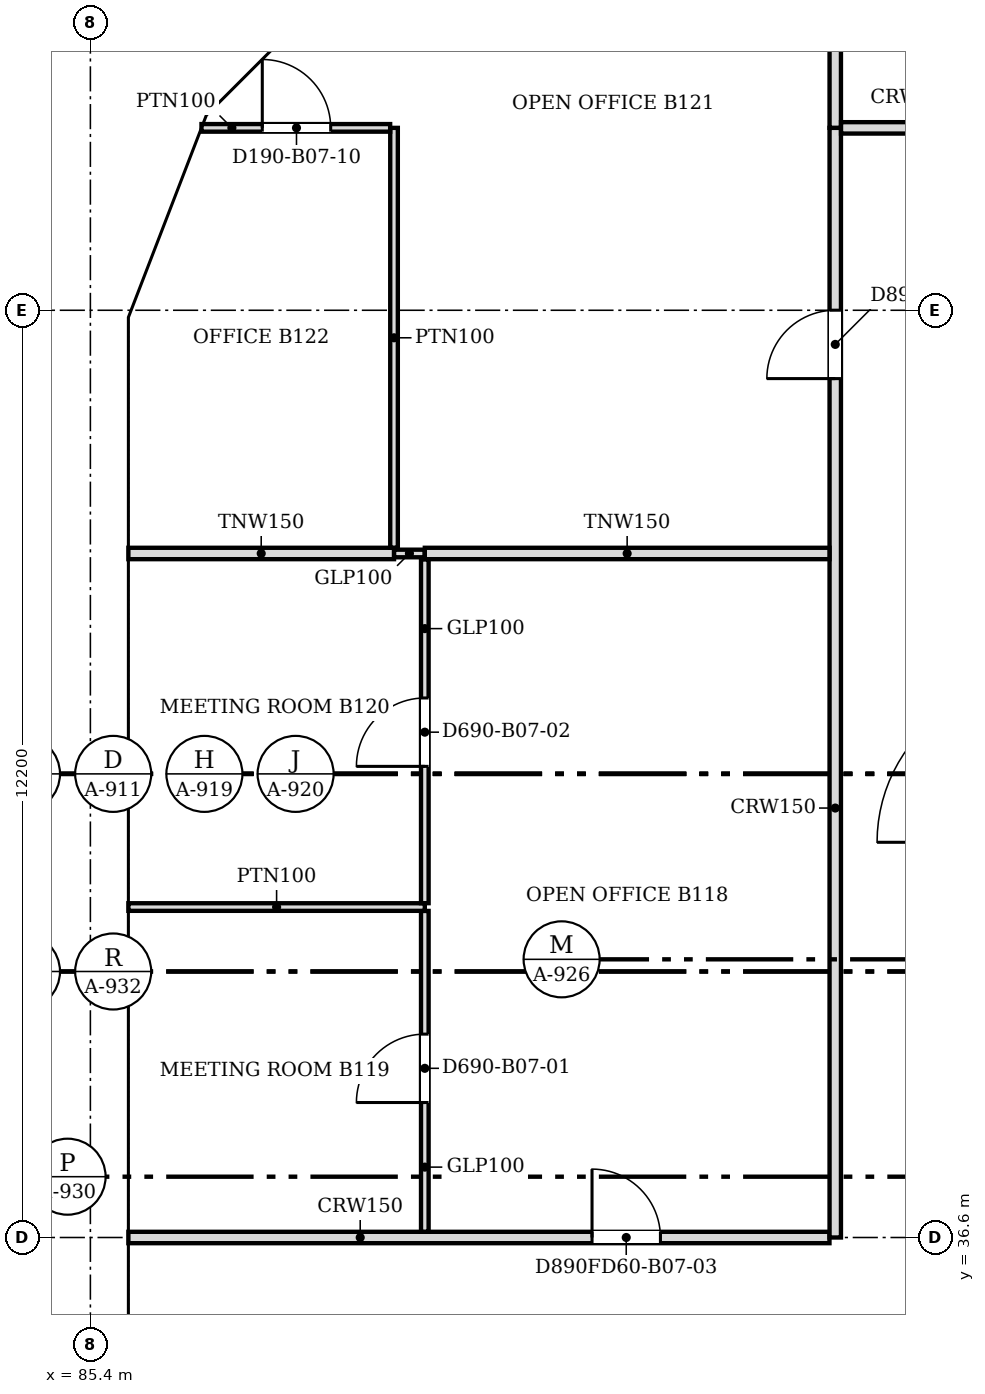
"""IFC4 building model, lengths in metres.
Left out: names, types, materials, properties, quantities, classifications, styles, units other than length and angle.
Written with IfcOpenShell. Run it as: python <this file> out.ifc"""

import sys

from ifc_helpers import new_model, si_unit, direction, frame, frame_2d, origin, place, context, subcontext, project, spatial, polyline, rectangle, outline, extrude, faceted_brep, source, transform, mapped, element, fill, save


model = new_model("IFC4")
c1 = context("Model", 3, precision=1e-05, world=origin(), true_north=direction((0.0, 1.0)))
c2 = subcontext(c1, "Body", "Model", "MODEL_VIEW")
j1 = project(units=[si_unit("LENGTHUNIT", "METRE"), si_unit("PLANEANGLEUNIT", "RADIAN")], contexts=[c1])
p1 = place(None, origin())
s1 = spatial("IfcSite", under=j1, at=p1, CompositionType="ELEMENT")
p2 = place(p1, origin())
s2 = spatial("IfcBuilding", under=s1, at=p2, CompositionType="ELEMENT")
p3 = place(p2, frame((0.0, 0.0, 72.4)))
s3 = spatial("IfcBuildingStorey", under=s2, at=p3, CompositionType="ELEMENT", Elevation=72.4)
m1 = source(origin(), c2, "Body", "Brep", [
    faceted_brep([(0.053, -0.25, 0.0), (2.997, -0.25, 3.8), (0.053, -0.25, 7.6), (0.0, -0.25, 7.532), (0.0, -0.25, 0.068), (0.106, 0.25, 7.531), (2.944, 0.25, 3.868), (2.944, 0.25, 3.732), (0.106, 0.25, 0.068), (2.997, 0.0, 3.8), (0.053, 0.0, 0.0), (0.053, 0.0, 7.6)], [[[0, 1, 2, 3, 4]], [[5, 6, 7, 8]], [[8, 7, 9, 1, 0, 10]], [[6, 5, 11, 2, 1, 9]], [[3, 2, 11]], [[10, 0, 4]], [[8, 10, 4, 3, 11, 5]], [[9, 7, 6]]]),
])
p4 = place(p3, frame((88.831, 53.625, -3.8), z_axis=(0.0, 0.0, 1.0), x_axis=(-0.707147509625, -0.707066050402, 0.0)))
e1 = element("IfcWall", 1, at=p4, inside=s3, PredefinedType="SOLIDWALL", context=c2, shape_type="MappedRepresentation", body=[
    mapped(m1, transform((0.0, 0.0, 0.0), scale=1.0)),
])
m2 = source(origin(), c2, "Body", "SweptSolid", [
    extrude(outline(polyline([(0.253, 0.666), (2.681, 3.8), (0.253, 6.934), (0.253, 0.666)])), frame((0.0, 0.26, 0.0), z_axis=(0.0, -1.0, 0.0), x_axis=(1.0, 0.0, 0.0)), (0.0, 0.0, 1.0), 0.52),
])
p5 = place(p4, origin())
e2 = element("IfcOpeningElement", 2, at=p5, cuts=e1, PredefinedType="OPENING", context=c2, shape_type="MappedRepresentation", body=[
    mapped(m2, transform((0.0, 0.0, 0.0), scale=1.0)),
])
m3 = source(origin(), c2, "Body", "Brep", [
    faceted_brep([(2.95, -0.25, 0.0), (2.997, -0.25, 0.059), (2.997, -0.25, 7.541), (2.95, -0.25, 7.6), (0.0, -0.25, 3.8), (0.053, 0.25, 3.868), (2.904, 0.25, 7.54), (2.904, 0.25, 0.06), (0.053, 0.25, 3.732), (2.95, 0.0, 0.0), (2.95, 0.0, 7.6), (0.0, 0.0, 3.8)], [[[0, 1, 2, 3, 4]], [[5, 6, 7, 8]], [[1, 0, 9]], [[10, 3, 2]], [[6, 5, 11, 4, 3, 10]], [[8, 7, 9, 0, 4, 11]], [[8, 11, 5]], [[1, 9, 7, 6, 10, 2]]]),
])
p6 = place(p3, frame((86.712, 51.506, -3.8), z_axis=(0.0, 0.0, 1.0), x_axis=(-0.359874094142, -0.933000876937, 0.0)))
e3 = element("IfcWall", 3, at=p6, inside=s3, PredefinedType="SOLIDWALL", context=c2, shape_type="MappedRepresentation", body=[
    mapped(m3, transform((0.0, 0.0, 0.0), scale=1.0)),
])
m4 = source(origin(), c2, "Body", "SweptSolid", [
    extrude(outline(polyline([(2.75, 6.935), (0.316, 3.8), (2.75, 0.665), (2.75, 6.935)])), frame((0.0, 0.26, 0.0), z_axis=(0.0, -1.0, 0.0), x_axis=(1.0, 0.0, 0.0)), (0.0, 0.0, 1.0), 0.52),
])
p7 = place(p6, origin())
e4 = element("IfcOpeningElement", 4, at=p7, cuts=e3, PredefinedType="OPENING", context=c2, shape_type="MappedRepresentation", body=[
    mapped(m4, transform((0.0, 0.0, 0.0), scale=1.0)),
])
m5 = source(origin(), c2, "Body", "Brep", [
    faceted_brep([(0.047, -0.25, 0.0), (3.05, -0.25, 3.8), (0.047, -0.25, 7.6), (0.0, -0.25, 7.54), (0.0, -0.25, 0.06), (0.093, 0.25, 7.541), (3.05, 0.25, 3.8), (0.093, 0.25, 0.059), (0.047, 0.0, 0.0), (0.047, 0.0, 7.6)], [[[0, 1, 2, 3, 4]], [[5, 6, 7]], [[7, 6, 1, 0, 8]], [[6, 5, 9, 2, 1]], [[3, 2, 9]], [[8, 0, 4]], [[7, 8, 4, 3, 9, 5]]]),
])
p8 = place(p3, frame((85.65, 48.8, -3.8), z_axis=(0.0, 0.0, 1.0), x_axis=(0.0, -1.0, 0.0)))
e5 = element("IfcWall", 5, at=p8, inside=s3, PredefinedType="SOLIDWALL", context=c2, shape_type="MappedRepresentation", body=[
    mapped(m5, transform((0.0, 0.0, 0.0), scale=1.0)),
])
m6 = source(origin(), c2, "Body", "SweptSolid", [
    extrude(outline(polyline([(0.247, 0.656), (2.731, 3.8), (0.247, 6.944), (0.247, 0.656)])), frame((0.0, 0.26, 0.0), z_axis=(0.0, -1.0, 0.0), x_axis=(1.0, 0.0, 0.0)), (0.0, 0.0, 1.0), 0.52),
])
p9 = place(p8, origin())
e6 = element("IfcOpeningElement", 6, at=p9, cuts=e5, PredefinedType="OPENING", context=c2, shape_type="MappedRepresentation", body=[
    mapped(m6, transform((0.0, 0.0, 0.0), scale=1.0)),
])
m7 = source(origin(), c2, "Body", "SweptSolid", [
    extrude(outline(polyline([(3.05, 0.0), (6.1, 3.8), (3.05, 7.6), (0.0, 3.8), (3.05, 0.0)])), frame((0.0, 0.25, 0.0), z_axis=(0.0, -1.0, 0.0), x_axis=(1.0, 0.0, 0.0)), (0.0, 0.0, 1.0), 0.5),
])
p10 = place(p3, frame((85.65, 45.75, -3.8), z_axis=(0.0, 0.0, 1.0), x_axis=(0.0, -1.0, 0.0)))
e7 = element("IfcWall", 7, at=p10, inside=s3, PredefinedType="SOLIDWALL", context=c2, shape_type="MappedRepresentation", body=[
    mapped(m7, transform((0.0, 0.0, 0.0), scale=1.0)),
])
m8 = source(origin(), c2, "Body", "SweptSolid", [
    extrude(outline(polyline([(3.05, 0.399), (5.78, 3.8), (3.05, 7.2), (0.321, 3.8), (3.05, 0.399)])), frame((0.0, 0.26, 0.0), z_axis=(0.0, -1.0, 0.0), x_axis=(1.0, 0.0, 0.0)), (0.0, 0.0, 1.0), 0.52),
])
p11 = place(p10, origin())
e8 = element("IfcOpeningElement", 8, at=p11, cuts=e7, PredefinedType="OPENING", context=c2, shape_type="MappedRepresentation", body=[
    mapped(m8, transform((0.0, 0.0, 0.0), scale=1.0)),
])
m9 = source(origin(), c2, "Body", "Brep", [
    faceted_brep([(3.05, -0.25, 0.0), (6.1, -0.25, 3.8), (6.1, -0.25, 3.8), (3.05, -0.25, 7.6), (0.0, -0.25, 3.8), (0.0, 0.25, 3.8), (3.05, 0.25, 7.6), (6.1, 0.25, 3.8), (6.1, 0.25, 3.8), (3.05, 0.25, 0.0)], [[[0, 1, 2, 3, 4]], [[5, 6, 7, 8, 9]], [[9, 8, 1, 0]], [[7, 6, 3, 2]], [[6, 5, 4, 3]], [[5, 9, 0, 4]], [[1, 8, 7, 2]]]),
])
p12 = place(p3, frame((85.65, 39.65, -3.8), z_axis=(0.0, 0.0, 1.0), x_axis=(0.0, -1.0, 0.0)))
e9 = element("IfcWall", 9, at=p12, inside=s3, PredefinedType="SOLIDWALL", context=c2, shape_type="MappedRepresentation", body=[
    mapped(m9, transform((0.0, 0.0, 0.0), scale=1.0)),
])
p13 = place(p12, origin())
e10 = element("IfcOpeningElement", 10, at=p13, cuts=e9, PredefinedType="OPENING", context=c2, shape_type="MappedRepresentation", body=[
    mapped(m8, transform((0.0, 0.0, 0.0), scale=1.0)),
])
p14 = place(p2, frame((0.0, 0.0, 76.2)))
s4 = spatial("IfcBuildingStorey", under=s2, at=p14, CompositionType="ELEMENT", Elevation=76.2)
m10 = source(origin(), c2, "Body", "Brep", [
    faceted_brep([(2.944, -0.25, 0.0), (2.997, -0.25, 0.068), (2.997, -0.25, 7.532), (2.944, -0.25, 7.6), (0.0, -0.25, 3.8), (0.053, 0.25, 3.868), (2.891, 0.25, 7.532), (2.891, 0.25, 0.068), (0.053, 0.25, 3.732), (2.944, 0.0, 0.0), (2.944, 0.0, 7.6), (0.0, 0.0, 3.8)], [[[0, 1, 2, 3, 4]], [[5, 6, 7, 8]], [[1, 0, 9]], [[10, 3, 2]], [[6, 5, 11, 4, 3, 10]], [[8, 7, 9, 0, 4, 11]], [[8, 11, 5]], [[1, 9, 7, 6, 10, 2]]]),
])
p15 = place(p14, frame((88.794, 53.588, -3.8), z_axis=(0.0, 0.0, 1.0), x_axis=(-0.707066050402, -0.707147509625, 0.0)))
e11 = element("IfcWall", 11, at=p15, inside=s4, PredefinedType="SOLIDWALL", context=c2, shape_type="MappedRepresentation", body=[
    mapped(m10, transform((0.0, 0.0, 0.0), scale=1.0)),
])
m11 = source(origin(), c2, "Body", "SweptSolid", [
    extrude(outline(polyline([(2.744, 6.934), (0.316, 3.8), (2.744, 0.667), (2.744, 6.934)])), frame((0.0, 0.26, 0.0), z_axis=(0.0, -1.0, 0.0), x_axis=(1.0, 0.0, 0.0)), (0.0, 0.0, 1.0), 0.52),
])
p16 = place(p15, origin())
e12 = element("IfcOpeningElement", 12, at=p16, cuts=e11, PredefinedType="OPENING", context=c2, shape_type="MappedRepresentation", body=[
    mapped(m11, transform((0.0, 0.0, 0.0), scale=1.0)),
])
m12 = source(origin(), c2, "Body", "Brep", [
    faceted_brep([(0.053, -0.25, 0.0), (3.003, -0.25, 3.8), (0.053, -0.25, 7.6), (0.0, -0.25, 7.532), (0.0, -0.25, 0.068), (0.106, 0.25, 7.532), (2.957, 0.25, 3.86), (2.957, 0.25, 3.74), (0.106, 0.25, 0.068), (3.003, 0.0, 3.8), (0.053, 0.0, 0.0), (0.053, 0.0, 7.6)], [[[0, 1, 2, 3, 4]], [[5, 6, 7, 8]], [[8, 7, 9, 1, 0, 10]], [[6, 5, 11, 2, 1, 9]], [[3, 2, 11]], [[10, 0, 4]], [[8, 10, 4, 3, 11, 5]], [[9, 7, 6]]]),
])
p17 = place(p14, frame((86.731, 51.556, -3.8), z_axis=(0.0, 0.0, 1.0), x_axis=(-0.359855894603, -0.933007896601, 0.0)))
e13 = element("IfcWall", 13, at=p17, inside=s4, PredefinedType="SOLIDWALL", context=c2, shape_type="MappedRepresentation", body=[
    mapped(m12, transform((0.0, 0.0, 0.0), scale=1.0)),
])
m13 = source(origin(), c2, "Body", "SweptSolid", [
    extrude(outline(polyline([(0.253, 0.665), (2.687, 3.8), (0.253, 6.935), (0.253, 0.665)])), frame((0.0, 0.26, 0.0), z_axis=(0.0, -1.0, 0.0), x_axis=(1.0, 0.0, 0.0)), (0.0, 0.0, 1.0), 0.52),
])
p18 = place(p17, origin())
e14 = element("IfcOpeningElement", 14, at=p18, cuts=e13, PredefinedType="OPENING", context=c2, shape_type="MappedRepresentation", body=[
    mapped(m13, transform((0.0, 0.0, 0.0), scale=1.0)),
])
m14 = source(origin(), c2, "Body", "Brep", [
    faceted_brep([(3.003, -0.25, 0.0), (6.053, -0.25, 3.8), (3.003, -0.25, 7.6), (0.0, -0.25, 3.8), (0.047, 0.25, 3.859), (3.003, 0.25, 7.6), (6.053, 0.25, 3.8), (3.003, 0.25, 0.0), (0.047, 0.25, 3.741), (0.0, 0.0, 3.8)], [[[0, 1, 2, 3]], [[4, 5, 6, 7, 8]], [[7, 6, 1, 0]], [[6, 5, 2, 1]], [[5, 4, 9, 3, 2]], [[8, 7, 0, 3, 9]], [[8, 9, 4]]]),
])
p19 = place(p14, frame((85.65, 48.753, -3.8), z_axis=(0.0, 0.0, 1.0), x_axis=(0.0, -1.0, 0.0)))
e15 = element("IfcWall", 15, at=p19, inside=s4, PredefinedType="SOLIDWALL", context=c2, shape_type="MappedRepresentation", body=[
    mapped(m14, transform((0.0, 0.0, 0.0), scale=1.0)),
])
m15 = source(origin(), c2, "Body", "SweptSolid", [
    extrude(outline(polyline([(3.005, 0.401), (5.733, 3.8), (3.005, 7.199), (0.319, 3.8), (3.005, 0.401)])), frame((0.0, 0.26, 0.0), z_axis=(0.0, -1.0, 0.0), x_axis=(1.0, 0.0, 0.0)), (0.0, 0.0, 1.0), 0.52),
])
p20 = place(p19, origin())
e16 = element("IfcOpeningElement", 16, at=p20, cuts=e15, PredefinedType="OPENING", context=c2, shape_type="MappedRepresentation", body=[
    mapped(m15, transform((0.0, 0.0, 0.0), scale=1.0)),
])
m16 = source(origin(), c2, "Body", "Brep", [
    faceted_brep([(3.05, -0.25, 0.0), (6.1, -0.25, 3.8), (6.1, -0.25, 3.8), (3.05, -0.25, 7.6), (0.0, -0.25, 3.8), (0.0, 0.25, 3.8), (3.05, 0.25, 7.6), (6.1, 0.25, 3.8), (6.1, 0.25, 3.8), (3.05, 0.25, 0.0)], [[[0, 1, 2, 3, 4]], [[5, 6, 7, 8, 9]], [[9, 8, 1, 0]], [[7, 6, 3, 2]], [[6, 5, 4, 3]], [[5, 9, 0, 4]], [[1, 8, 7, 2]]]),
])
p21 = place(p14, frame((85.65, 42.7, -3.8), z_axis=(0.0, 0.0, 1.0), x_axis=(0.0, -1.0, 0.0)))
e17 = element("IfcWall", 17, at=p21, inside=s4, PredefinedType="SOLIDWALL", context=c2, shape_type="MappedRepresentation", body=[
    mapped(m16, transform((0.0, 0.0, 0.0), scale=1.0)),
])
m17 = source(origin(), c2, "Body", "SweptSolid", [
    extrude(outline(polyline([(3.05, 0.399), (5.78, 3.8), (3.05, 7.201), (0.321, 3.8), (3.05, 0.399)])), frame((0.0, 0.26, 0.0), z_axis=(0.0, -1.0, 0.0), x_axis=(1.0, 0.0, 0.0)), (0.0, 0.0, 1.0), 0.52),
])
p22 = place(p21, origin())
e18 = element("IfcOpeningElement", 18, at=p22, cuts=e17, PredefinedType="OPENING", context=c2, shape_type="MappedRepresentation", body=[
    mapped(m17, transform((0.0, 0.0, 0.0), scale=1.0)),
])
m18 = source(origin(), c2, "Body", "SweptSolid", [
    extrude(outline(polyline([(3.05, 0.0), (6.1, 3.8), (3.05, 7.6), (0.0, 3.8), (3.05, 0.0)])), frame((0.0, 0.25, 0.0), z_axis=(0.0, -1.0, 0.0), x_axis=(1.0, 0.0, 0.0)), (0.0, 0.0, 1.0), 0.5),
])
p23 = place(p14, frame((85.65, 36.6, -3.8), z_axis=(0.0, 0.0, 1.0), x_axis=(0.0, -1.0, 0.0)))
e19 = element("IfcWall", 19, at=p23, inside=s4, PredefinedType="SOLIDWALL", context=c2, shape_type="MappedRepresentation", body=[
    mapped(m18, transform((0.0, 0.0, 0.0), scale=1.0)),
])
p24 = place(p23, origin())
e20 = element("IfcOpeningElement", 20, at=p24, cuts=e19, PredefinedType="OPENING", context=c2, shape_type="MappedRepresentation", body=[
    mapped(m17, transform((0.0, 0.0, 0.0), scale=1.0)),
])
p25 = place(p3, frame((85.9, 36.6, 0.0), z_axis=(0.0, 0.0, 1.0), x_axis=(1.0, 0.0, 0.0)))
e21 = element("IfcWall", 21, at=p25, inside=s3, PredefinedType="PARTITIONING", context=c2, shape_type="SweptSolid", body=[
    extrude(rectangle(XDim=9.224, YDim=0.15, at=frame_2d((4.612, 0.0))), origin(), (0.0, 0.0, 1.0), 3.067),
])
m19 = source(origin(), c2, "Body", "SweptSolid", [
    extrude(rectangle(XDim=0.9, YDim=2.1, at=frame_2d((0.45, 1.05))), frame((0.0, 0.085, 0.0), z_axis=(0.0, -1.0, 0.0), x_axis=(1.0, 0.0, 0.0)), (0.0, 0.0, 1.0), 0.17),
])
p26 = place(p25, frame((6.1, 0.0, 0.0)))
e22 = element("IfcOpeningElement", 22, at=p26, cuts=e21, PredefinedType="OPENING", context=c2, shape_type="MappedRepresentation", body=[
    mapped(m19, transform((0.0, 0.0, 0.0), scale=1.0)),
])
p27 = place(p3, frame((95.2, 36.6, 0.0), z_axis=(0.0, 0.0, 1.0), x_axis=(0.0, 1.0, 0.0)))
e23 = element("IfcWall", 23, at=p27, inside=s3, PredefinedType="PARTITIONING", context=c2, shape_type="SweptSolid", body=[
    extrude(rectangle(XDim=14.6, YDim=0.15, at=frame_2d((7.3, 0.0))), origin(), (0.0, 0.0, 1.0), 3.067),
])
p28 = place(p27, frame((11.301, 0.0, 0.0)))
e24 = element("IfcOpeningElement", 24, at=p28, cuts=e23, PredefinedType="OPENING", context=c2, shape_type="MappedRepresentation", body=[
    mapped(m19, transform((0.0, 0.0, 0.0), scale=1.0)),
])
p29 = place(p3, frame((89.8, 36.676, 0.0), z_axis=(0.0, 0.0, 1.0), x_axis=(0.0, 1.0, 0.0)))
e25 = element("IfcWall", 25, at=p29, inside=s3, PredefinedType="PARTITIONING", context=c2, shape_type="SweptSolid", body=[
    extrude(rectangle(XDim=4.221, YDim=0.1, at=frame_2d((2.11, 0.0))), origin(), (0.0, 0.0, 1.0), 3.067),
])
m20 = source(origin(), c2, "Body", "SweptSolid", [
    extrude(rectangle(XDim=0.9, YDim=2.1, at=frame_2d((0.45, 1.05))), frame((0.0, 0.06, 0.0), z_axis=(0.0, -1.0, 0.0), x_axis=(1.0, 0.0, 0.0)), (0.0, 0.0, 1.0), 0.12),
])
p30 = place(p29, frame((1.7, 0.0, 0.0)))
e26 = element("IfcOpeningElement", 26, at=p30, cuts=e25, PredefinedType="OPENING", context=c2, shape_type="MappedRepresentation", body=[
    mapped(m20, transform((0.0, 0.0, 0.0), scale=1.0)),
])
p31 = place(p3, frame((85.9, 40.948, 0.0), z_axis=(0.0, 0.0, 1.0), x_axis=(1.0, 0.0, 0.0)))
e27 = element("IfcWall", 27, at=p31, inside=s3, PredefinedType="PARTITIONING", context=c2, shape_type="SweptSolid", body=[
    extrude(rectangle(XDim=3.9, YDim=0.1, at=frame_2d((1.95, 0.0))), origin(), (0.0, 0.0, 1.0), 3.067),
])
p32 = place(p3, frame((89.8, 40.999, 0.0), z_axis=(0.0, 0.0, 1.0), x_axis=(0.0, 1.0, 0.0)))
e28 = element("IfcWall", 28, at=p32, inside=s3, PredefinedType="PARTITIONING", context=c2, shape_type="SweptSolid", body=[
    extrude(rectangle(XDim=4.525, YDim=0.1, at=frame_2d((2.263, 0.0))), origin(), (0.0, 0.0, 1.0), 3.067),
])
p33 = place(p32, frame((1.8, 0.0, 0.0)))
e29 = element("IfcOpeningElement", 29, at=p33, cuts=e28, PredefinedType="OPENING", context=c2, shape_type="MappedRepresentation", body=[
    mapped(m20, transform((0.0, 0.0, 0.0), scale=1.0)),
])
p34 = place(p3, frame((85.9, 45.6, 0.0), z_axis=(0.0, 0.0, 1.0), x_axis=(1.0, 0.0, 0.0)))
e30 = element("IfcWall", 30, at=p34, inside=s3, PredefinedType="PARTITIONING", context=c2, shape_type="SweptSolid", body=[
    extrude(rectangle(XDim=3.495, YDim=0.15, at=frame_2d((1.748, 0.0))), origin(), (0.0, 0.0, 1.0), 3.067),
])
p35 = place(p3, frame((89.396, 45.6, 0.0), z_axis=(0.0, 0.0, 1.0), x_axis=(1.0, 0.0, 0.0)))
e31 = element("IfcWall", 31, at=p35, inside=s3, PredefinedType="PARTITIONING", context=c2, shape_type="SweptSolid", body=[
    extrude(rectangle(XDim=0.403, YDim=0.1, at=frame_2d((0.202, 0.0))), origin(), (0.0, 0.0, 1.0), 3.067),
])
p36 = place(p3, frame((89.8, 45.6, 0.0), z_axis=(0.0, 0.0, 1.0), x_axis=(1.0, 0.0, 0.0)))
e32 = element("IfcWall", 32, at=p36, inside=s3, PredefinedType="PARTITIONING", context=c2, shape_type="SweptSolid", body=[
    extrude(rectangle(XDim=5.324, YDim=0.15, at=frame_2d((2.662, 0.0))), origin(), (0.0, 0.0, 1.0), 3.067),
])
p37 = place(p3, frame((89.395, 45.676, 0.0), z_axis=(0.0, 0.0, 1.0), x_axis=(0.0, 1.0, 0.0)))
e33 = element("IfcWall", 33, at=p37, inside=s3, PredefinedType="PARTITIONING", context=c2, shape_type="SweptSolid", body=[
    extrude(rectangle(XDim=5.524, YDim=0.1, at=frame_2d((2.762, 0.0))), origin(), (0.0, 0.0, 1.0), 3.067),
])
p38 = place(p3, frame((89.344, 51.2, 0.0), z_axis=(0.0, 0.0, 1.0), x_axis=(-1.0, 0.0, 0.0)))
e34 = element("IfcWall", 34, at=p38, inside=s3, PredefinedType="PARTITIONING", context=c2, shape_type="SweptSolid", body=[
    extrude(rectangle(XDim=2.482, YDim=0.1, at=frame_2d((1.241, 0.0))), origin(), (0.0, 0.0, 1.0), 3.067),
])
p39 = place(p38, frame((0.782, 0.0, 0.0)))
e35 = element("IfcOpeningElement", 35, at=p39, cuts=e34, PredefinedType="OPENING", context=c2, shape_type="MappedRepresentation", body=[
    mapped(m20, transform((0.0, 0.0, 0.0), scale=1.0)),
])
p40 = place(p3, frame((95.2, 51.201, 0.0), z_axis=(0.0, 0.0, 1.0), x_axis=(0.0, 1.0, 0.0)))
e36 = element("IfcWall", 36, at=p40, inside=s3, PredefinedType="PARTITIONING", context=c2, shape_type="SweptSolid", body=[
    extrude(rectangle(XDim=3.199, YDim=0.15, at=frame_2d((1.6, 0.0))), origin(), (0.0, 0.0, 1.0), 3.067),
])
p41 = place(p3, frame((95.276, 51.2, 0.0), z_axis=(0.0, 0.0, 1.0), x_axis=(1.0, 0.0, 0.0)))
e37 = element("IfcWall", 37, at=p41, inside=s3, PredefinedType="PARTITIONING", context=c2, shape_type="SweptSolid", body=[
    extrude(rectangle(XDim=4.724, YDim=0.15, at=frame_2d((2.362, 0.0))), origin(), (0.0, 0.0, 1.0), 3.067),
])
m21 = source(origin(), c2, "Body", "SweptSolid", [
    extrude(rectangle(XDim=1.0, YDim=2.1, at=frame_2d((0.5, 1.05))), frame((0.0, 0.085, 0.0), z_axis=(0.0, -1.0, 0.0), x_axis=(1.0, 0.0, 0.0)), (0.0, 0.0, 1.0), 0.17),
])
p42 = place(p41, frame((1.9, 0.0, 0.0)))
e38 = element("IfcOpeningElement", 38, at=p42, cuts=e37, PredefinedType="OPENING", context=c2, shape_type="MappedRepresentation", body=[
    mapped(m21, transform((0.0, 0.0, 0.0), scale=1.0)),
])
m22 = source(origin(), c2, "Body", "SweptSolid", [
    extrude(rectangle(XDim=0.9, YDim=2.1, at=frame_2d((0.45, 1.05))), frame((0.0, 0.025, 0.0), z_axis=(0.0, -1.0, 0.0), x_axis=(1.0, 0.0, 0.0)), (0.0, 0.0, 1.0), 0.05),
])
p43 = place(p30, origin())
e39 = element("IfcDoor", 39, at=p43, inside=s3, OperationType="SINGLE_SWING_LEFT", PredefinedType="DOOR", context=c2, shape_type="MappedRepresentation", body=[
    mapped(m22, transform((0.0, 0.0, 0.0), scale=1.0)),
])
fill(e26, e39)
p44 = place(p33, origin())
e40 = element("IfcDoor", 40, at=p44, inside=s3, OperationType="SINGLE_SWING_LEFT", PredefinedType="DOOR", context=c2, shape_type="MappedRepresentation", body=[
    mapped(m22, transform((0.0, 0.0, 0.0), scale=1.0)),
])
fill(e29, e40)
p45 = place(p28, origin())
e41 = element("IfcDoor", 41, at=p45, inside=s3, OperationType="SINGLE_SWING_LEFT", PredefinedType="DOOR", context=c2, shape_type="MappedRepresentation", body=[
    mapped(m22, transform((0.0, 0.0, 0.0), scale=1.0)),
])
fill(e24, e41)
p46 = place(p39, origin())
e42 = element("IfcDoor", 42, at=p46, inside=s3, OperationType="SINGLE_SWING_RIGHT", PredefinedType="DOOR", context=c2, shape_type="MappedRepresentation", body=[
    mapped(m22, transform((0.0, 0.0, 0.0), scale=1.0)),
])
fill(e35, e42)
p47 = place(p26, origin())
e43 = element("IfcDoor", 43, at=p47, inside=s3, OperationType="SINGLE_SWING_LEFT", PredefinedType="DOOR", context=c2, shape_type="MappedRepresentation", body=[
    mapped(m22, transform((0.0, 0.0, 0.0), scale=1.0)),
])
fill(e22, e43)
save(model, sys.argv[1])
